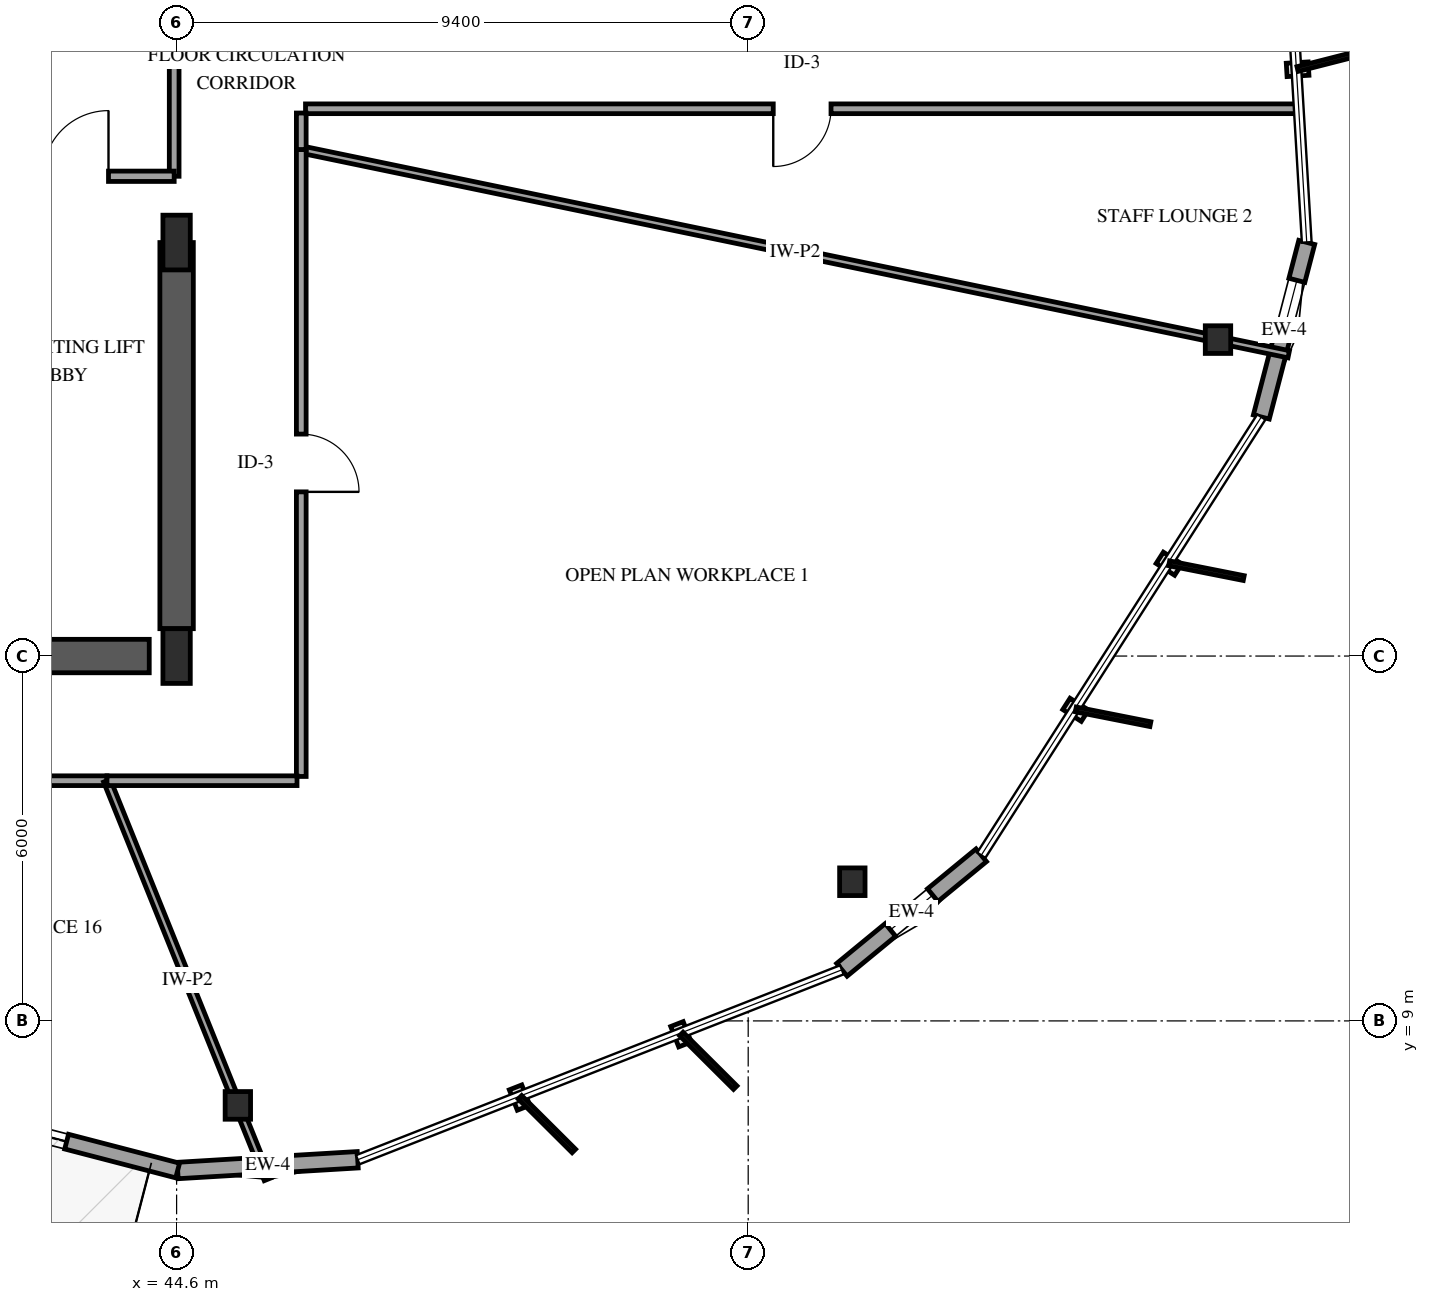
"""IFC4 building model, lengths in metres.
Left out: names, types, materials, properties, quantities, classifications, styles, units other than length and angle.
Written with IfcOpenShell. Run it as: python <this file> out.ifc"""

import sys

from ifc_helpers import new_model, si_unit, direction, frame, frame_2d, origin, origin_2d, place, context, subcontext, project, spatial, rectangle, i_section, extrude, element, fill, save


model = new_model("IFC4")
c1 = context("Model", 3, precision=1e-05, world=origin(), true_north=direction((0.0, 1.0)))
c2 = subcontext(c1, "Body", "Model", "MODEL_VIEW")
j1 = project(units=[si_unit("LENGTHUNIT", "METRE"), si_unit("PLANEANGLEUNIT", "RADIAN")], contexts=[c1])
p1 = place(None, origin())
s1 = spatial("IfcSite", under=j1, at=p1, CompositionType="ELEMENT")
p2 = place(p1, origin())
s2 = spatial("IfcBuilding", under=s1, at=p2, CompositionType="ELEMENT")
p3 = place(p2, frame((0.0, 0.0, 110.8)))
s3 = spatial("IfcBuildingStorey", under=s2, at=p3, CompositionType="ELEMENT", Elevation=110.8)
p4 = place(p3, frame((41.3, 15.0, 0.0), z_axis=(0.0, 0.0, 1.0), x_axis=(1.0, 0.0, 0.0)))
e1 = element("IfcWall", 1, at=p4, inside=s3, PredefinedType="SHEAR", context=c2, shape_type="SweptSolid", body=[
    extrude(rectangle(XDim=2.85, YDim=0.55, at=frame_2d((1.425, 0.0))), origin(), (0.0, 0.0, 1.0), 3.9),
])
p5 = place(p3, frame((44.6, 15.45, 0.0), z_axis=(0.0, 0.0, 1.0), x_axis=(0.0, 1.0, 0.0)))
e2 = element("IfcWall", 2, at=p5, inside=s3, PredefinedType="SHEAR", context=c2, shape_type="SweptSolid", body=[
    extrude(rectangle(XDim=6.35, YDim=0.55, at=frame_2d((3.175, 0.0))), origin(), (0.0, 0.0, 1.0), 3.9),
])
for number, where, z_axis, x_axis in (
    (3, (44.6, 15.0, 0.0), (0.0, 0.0, 1.0), (1.0, 0.0, 0.0)),
    (4, (44.6, 21.8, 0.0), (0.0, 0.0, 1.0), (1.0, 0.0, 0.0)),
):
    element("IfcColumn", number, at=place(p3, frame(where, z_axis=z_axis, x_axis=x_axis)), inside=s3, PredefinedType="PILASTER", context=c2, shape_type="SweptSolid", body=[
        extrude(rectangle(XDim=0.45, YDim=0.9, at=origin_2d()), origin(), (0.0, 0.0, 1.0), 3.9),
    ])
for number, where, z_axis, x_axis in (
    (5, (45.607, 7.611, 0.0), (0.0, 0.0, 1.0), (1.0, 0.0, 0.0)),
    (6, (55.712, 11.289, 0.0), (0.0, 0.0, 1.0), (1.0, 0.0, 0.0)),
    (7, (61.726, 20.204, 0.0), (0.0, 0.0, 1.0), (1.0, 0.0, 0.0)),
):
    element("IfcColumn", number, at=place(p3, frame(where, z_axis=z_axis, x_axis=x_axis)), inside=s3, PredefinedType="COLUMN", context=c2, shape_type="SweptSolid", body=[
        extrude(i_section(OverallWidth=0.418, OverallDepth=0.455, WebThickness=0.042, FlangeThickness=0.068, FilletRadius=0.038, at=origin_2d()), origin(), (0.0, 0.0, 1.0), 3.9),
    ])
p6 = place(p3, frame((44.617, 6.54, 0.0), z_axis=(0.0, 0.0, 1.0), x_axis=(0.998218594755, 0.059662694245, 0.0)))
e8 = element("IfcWall", 8, at=p6, inside=s3, PredefinedType="SOLIDWALL", context=c2, shape_type="SweptSolid", body=[
    extrude(rectangle(XDim=2.967, YDim=0.27, at=frame_2d((1.483, 0.0))), origin(), (0.0, 0.0, 1.0), 2.979),
])
p7 = place(p3, frame((36.34, 8.693, 0.0), z_axis=(0.0, 0.0, 1.0), x_axis=(0.967796780787, -0.251732777164, 0.0)))
e9 = element("IfcWall", 9, at=p7, inside=s3, PredefinedType="SOLIDWALL", context=c2, shape_type="SweptSolid", body=[
    extrude(rectangle(XDim=8.553, YDim=0.25, at=frame_2d((4.276, 0.0))), origin(), (0.0, 0.0, 1.0), 2.979),
])
p8 = place(p7, frame((3.777, 0.0, 0.0)))
e10 = element("IfcOpeningElement", 10, at=p8, cuts=e9, PredefinedType="OPENING", context=c2, shape_type="SweptSolid", body=[
    extrude(rectangle(XDim=1.05, YDim=2.15, at=frame_2d((0.525, 1.075))), frame((0.0, 0.135, 0.0), z_axis=(0.0, -1.0, 0.0), x_axis=(1.0, 0.0, 0.0)), (0.0, 0.0, 1.0), 0.27),
])
p9 = place(p7, frame((0.44, 0.0, 0.72)))
e11 = element("IfcOpeningElement", 11, at=p9, cuts=e9, PredefinedType="OPENING", context=c2, shape_type="SweptSolid", body=[
    extrude(rectangle(XDim=1.2, YDim=1.6, at=frame_2d((0.6, 0.8))), frame((0.0, 0.135, 0.0), z_axis=(0.0, -1.0, 0.0), x_axis=(1.0, 0.0, 0.0)), (0.0, 0.0, 1.0), 0.27),
])
p10 = place(p7, frame((5.467, 0.0, 0.72)))
e12 = element("IfcOpeningElement", 12, at=p10, cuts=e9, PredefinedType="OPENING", context=c2, shape_type="SweptSolid", body=[
    extrude(rectangle(XDim=1.2, YDim=1.6, at=frame_2d((0.6, 0.8))), frame((0.0, 0.135, 0.0), z_axis=(0.0, -1.0, 0.0), x_axis=(1.0, 0.0, 0.0)), (0.0, 0.0, 1.0), 0.27),
])
p11 = place(p3, frame((55.541, 9.84, 0.0), z_axis=(0.0, 0.0, 1.0), x_axis=(0.772514297214, 0.634997370545, 0.0)))
e13 = element("IfcWall", 13, at=p11, inside=s3, PredefinedType="SOLIDWALL", context=c2, shape_type="SweptSolid", body=[
    extrude(rectangle(XDim=2.967, YDim=0.27, at=frame_2d((1.483, 0.0))), origin(), (0.0, 0.0, 1.0), 2.979),
])
p12 = place(p11, frame((1.033, 0.0, 0.75)))
e14 = element("IfcOpeningElement", 14, at=p12, cuts=e13, PredefinedType="OPENING", context=c2, shape_type="SweptSolid", body=[
    extrude(rectangle(XDim=0.9, YDim=1.5, at=frame_2d((0.45, 0.75))), frame((0.0, 0.145, 0.0), z_axis=(0.0, -1.0, 0.0), x_axis=(1.0, 0.0, 0.0)), (0.0, 0.0, 1.0), 0.29),
])
p13 = place(p3, frame((62.438, 18.931, 0.0), z_axis=(0.0, 0.0, 1.0), x_axis=(0.251741768545, 0.967794442002, 0.0)))
e15 = element("IfcWall", 15, at=p13, inside=s3, PredefinedType="SOLIDWALL", context=c2, shape_type="SweptSolid", body=[
    extrude(rectangle(XDim=2.967, YDim=0.27, at=frame_2d((1.483, 0.0))), origin(), (0.0, 0.0, 1.0), 2.979),
])
p14 = place(p13, frame((1.422, 0.0, 0.75)))
e16 = element("IfcOpeningElement", 16, at=p14, cuts=e15, PredefinedType="OPENING", context=c2, shape_type="SweptSolid", body=[
    extrude(rectangle(XDim=0.9, YDim=1.5, at=frame_2d((0.45, 0.75))), frame((0.0, 0.145, 0.0), z_axis=(0.0, -1.0, 0.0), x_axis=(1.0, 0.0, 0.0)), (0.0, 0.0, 1.0), 0.29),
])
p15 = place(p3, frame((46.65, 23.33, 0.0), z_axis=(0.0, 0.0, 1.0), x_axis=(0.979171899111, -0.203032982523, 0.0)))
e17 = element("IfcWall", 17, at=p15, inside=s3, PredefinedType="PARTITIONING", context=c2, shape_type="SweptSolid", body=[
    extrude(rectangle(XDim=16.584, YDim=0.12, at=frame_2d((8.292, 0.0))), origin(), (0.0, 0.0, 1.0), 2.895),
])
p16 = place(p3, frame((63.054, 24.0, 0.0), z_axis=(0.0, 0.0, 1.0), x_axis=(-1.0, 0.0, 0.0)))
e18 = element("IfcWall", 18, at=p16, inside=s3, PredefinedType="PARTITIONING", context=c2, shape_type="SweptSolid", body=[
    extrude(rectangle(XDim=16.334, YDim=0.16, at=frame_2d((8.167, 0.0))), origin(), (0.0, 0.0, 1.0), 3.6),
])
p17 = place(p16, frame((7.692, 0.0, 0.0)))
e19 = element("IfcOpeningElement", 19, at=p17, cuts=e18, PredefinedType="OPENING", context=c2, shape_type="SweptSolid", body=[
    extrude(rectangle(XDim=0.95, YDim=2.15, at=frame_2d((0.475, 1.075))), frame((0.0, 0.09, 0.0), z_axis=(0.0, -1.0, 0.0), x_axis=(1.0, 0.0, 0.0)), (0.0, 0.0, 1.0), 0.18),
])
p18 = place(p3, frame((46.65, 23.33, 0.0), z_axis=(0.0, 0.0, 1.0), x_axis=(0.0, -1.0, 0.0)))
e20 = element("IfcWall", 20, at=p18, inside=s3, PredefinedType="PARTITIONING", context=c2, shape_type="SweptSolid", body=[
    extrude(rectangle(XDim=10.31, YDim=0.16, at=frame_2d((5.155, 0.0))), origin(), (0.0, 0.0, 1.0), 3.6),
])
p19 = place(p18, frame((4.68, 0.0, 0.0)))
e21 = element("IfcOpeningElement", 21, at=p19, cuts=e20, PredefinedType="OPENING", context=c2, shape_type="SweptSolid", body=[
    extrude(rectangle(XDim=0.95, YDim=2.15, at=frame_2d((0.475, 1.075))), frame((0.0, 0.09, 0.0), z_axis=(0.0, -1.0, 0.0), x_axis=(1.0, 0.0, 0.0)), (0.0, 0.0, 1.0), 0.18),
])
p20 = place(p3, frame((43.455, 12.95, 0.0), z_axis=(0.0, 0.0, 1.0), x_axis=(-1.0, 0.0, 0.0)))
e22 = element("IfcWall", 22, at=p20, inside=s3, PredefinedType="PARTITIONING", context=c2, shape_type="SweptSolid", body=[
    extrude(rectangle(XDim=7.636, YDim=0.16, at=frame_2d((3.818, 0.0))), origin(), (0.0, 0.0, 1.0), 3.6),
])
p21 = place(p20, frame((3.343, 0.0, 0.0)))
e23 = element("IfcOpeningElement", 23, at=p21, cuts=e22, PredefinedType="OPENING", context=c2, shape_type="SweptSolid", body=[
    extrude(rectangle(XDim=0.95, YDim=2.15, at=frame_2d((0.475, 1.075))), frame((0.0, 0.09, 0.0), z_axis=(0.0, -1.0, 0.0), x_axis=(1.0, 0.0, 0.0)), (0.0, 0.0, 1.0), 0.18),
])
p22 = place(p3, frame((43.455, 12.95, 0.0), z_axis=(0.0, 0.0, 1.0), x_axis=(0.373813530102, -0.927503878543, 0.0)))
e24 = element("IfcWall", 24, at=p22, inside=s3, PredefinedType="PARTITIONING", context=c2, shape_type="SweptSolid", body=[
    extrude(rectangle(XDim=7.067, YDim=0.12, at=frame_2d((3.534, 0.0))), origin(), (0.0, 0.0, 1.0), 2.895),
])
p23 = place(p3, frame((44.56, 29.8, 0.0), z_axis=(0.0, 0.0, 1.0), x_axis=(0.0, -1.0, 0.0)))
e25 = element("IfcWall", 25, at=p23, inside=s3, PredefinedType="PARTITIONING", context=c2, shape_type="SweptSolid", body=[
    extrude(rectangle(XDim=6.91, YDim=0.16, at=frame_2d((3.455, 0.0))), origin(), (0.0, 0.0, 1.0), 2.64),
])
p24 = place(p23, frame((2.915, 0.0, 0.0)))
e26 = element("IfcOpeningElement", 26, at=p24, cuts=e25, PredefinedType="OPENING", context=c2, shape_type="SweptSolid", body=[
    extrude(rectangle(XDim=1.08, YDim=2.15, at=frame_2d((0.54, 1.075))), frame((0.0, 0.09, 0.0), z_axis=(0.0, -1.0, 0.0), x_axis=(1.0, 0.0, 0.0)), (0.0, 0.0, 1.0), 0.18),
])
p25 = place(p3, frame((41.32, 22.89, 0.0), z_axis=(0.0, 0.0, 1.0), x_axis=(1.0, 0.0, 0.0)))
e27 = element("IfcWall", 27, at=p25, inside=s3, PredefinedType="PARTITIONING", context=c2, shape_type="SweptSolid", body=[
    extrude(rectangle(XDim=3.24, YDim=0.17, at=frame_2d((1.62, 0.0))), origin(), (0.0, 0.0, 1.0), 3.6),
])
p26 = place(p25, frame((1.08, 0.0, 0.0)))
e28 = element("IfcOpeningElement", 28, at=p26, cuts=e27, PredefinedType="OPENING", context=c2, shape_type="SweptSolid", body=[
    extrude(rectangle(XDim=1.08, YDim=2.15, at=frame_2d((0.54, 1.075))), frame((0.0, 0.095, 0.0), z_axis=(0.0, -1.0, 0.0), x_axis=(1.0, 0.0, 0.0)), (0.0, 0.0, 1.0), 0.19),
])
p27 = place(p3, frame((46.58, 12.95, 0.0), z_axis=(0.0, 0.0, 1.0), x_axis=(-1.0, 0.0, 0.0)))
e29 = element("IfcWall", 29, at=p27, inside=s3, PredefinedType="PARTITIONING", context=c2, shape_type="SweptSolid", body=[
    extrude(rectangle(XDim=3.125, YDim=0.16, at=frame_2d((1.562, 0.0))), origin(), (0.0, 0.0, 1.0), 3.6),
])
p28 = place(p3, frame((46.65, 23.93, 0.0), z_axis=(0.0, 0.0, 1.0), x_axis=(0.0, -1.0, 0.0)))
e30 = element("IfcWall", 30, at=p28, inside=s3, PredefinedType="PARTITIONING", context=c2, shape_type="SweptSolid", body=[
    extrude(rectangle(XDim=0.6, YDim=0.16, at=frame_2d((0.3, 0.0))), origin(), (0.0, 0.0, 1.0), 3.6),
])
p29 = place(p10, origin())
e31 = element("IfcWindow", 31, at=p29, inside=s3, PartitioningType="SINGLE_PANEL", PredefinedType="WINDOW", context=c2, shape_type="SweptSolid", body=[
    extrude(rectangle(XDim=1.2, YDim=1.6, at=frame_2d((0.6, 0.8))), frame((0.0, 0.03, 0.0), z_axis=(0.0, -1.0, 0.0), x_axis=(1.0, 0.0, 0.0)), (0.0, 0.0, 1.0), 0.06),
])
fill(e12, e31)
p30 = place(p12, origin())
e32 = element("IfcWindow", 32, at=p30, inside=s3, PartitioningType="SINGLE_PANEL", PredefinedType="WINDOW", context=c2, shape_type="SweptSolid", body=[
    extrude(rectangle(XDim=0.9, YDim=1.5, at=frame_2d((0.45, 0.75))), frame((0.0, 0.03, 0.0), z_axis=(0.0, -1.0, 0.0), x_axis=(1.0, 0.0, 0.0)), (0.0, 0.0, 1.0), 0.06),
])
fill(e14, e32)
p31 = place(p14, origin())
e33 = element("IfcWindow", 33, at=p31, inside=s3, PartitioningType="SINGLE_PANEL", PredefinedType="WINDOW", context=c2, shape_type="SweptSolid", body=[
    extrude(rectangle(XDim=0.9, YDim=1.5, at=frame_2d((0.45, 0.75))), frame((0.0, 0.03, 0.0), z_axis=(0.0, -1.0, 0.0), x_axis=(1.0, 0.0, 0.0)), (0.0, 0.0, 1.0), 0.06),
])
fill(e16, e33)
p32 = place(p17, origin())
e34 = element("IfcDoor", 34, at=p32, inside=s3, OperationType="SINGLE_SWING_RIGHT", PredefinedType="DOOR", context=c2, shape_type="SweptSolid", body=[
    extrude(rectangle(XDim=0.95, YDim=2.15, at=frame_2d((0.475, 1.075))), frame((0.0, 0.025, 0.0), z_axis=(0.0, -1.0, 0.0), x_axis=(1.0, 0.0, 0.0)), (0.0, 0.0, 1.0), 0.05),
])
fill(e19, e34)
p33 = place(p19, origin())
e35 = element("IfcDoor", 35, at=p33, inside=s3, OperationType="SINGLE_SWING_RIGHT", PredefinedType="DOOR", context=c2, shape_type="SweptSolid", body=[
    extrude(rectangle(XDim=0.95, YDim=2.15, at=frame_2d((0.475, 1.075))), frame((0.0, 0.025, 0.0), z_axis=(0.0, -1.0, 0.0), x_axis=(1.0, 0.0, 0.0)), (0.0, 0.0, 1.0), 0.05),
])
fill(e21, e35)
p34 = place(p26, origin())
e36 = element("IfcDoor", 36, at=p34, inside=s3, OperationType="SINGLE_SWING_RIGHT", PredefinedType="DOOR", context=c2, shape_type="SweptSolid", body=[
    extrude(rectangle(XDim=1.08, YDim=2.15, at=frame_2d((0.54, 1.075))), frame((0.0, 0.025, 0.0), z_axis=(0.0, -1.0, 0.0), x_axis=(1.0, 0.0, 0.0)), (0.0, 0.0, 1.0), 0.05),
])
fill(e28, e36)
save(model, sys.argv[1])
